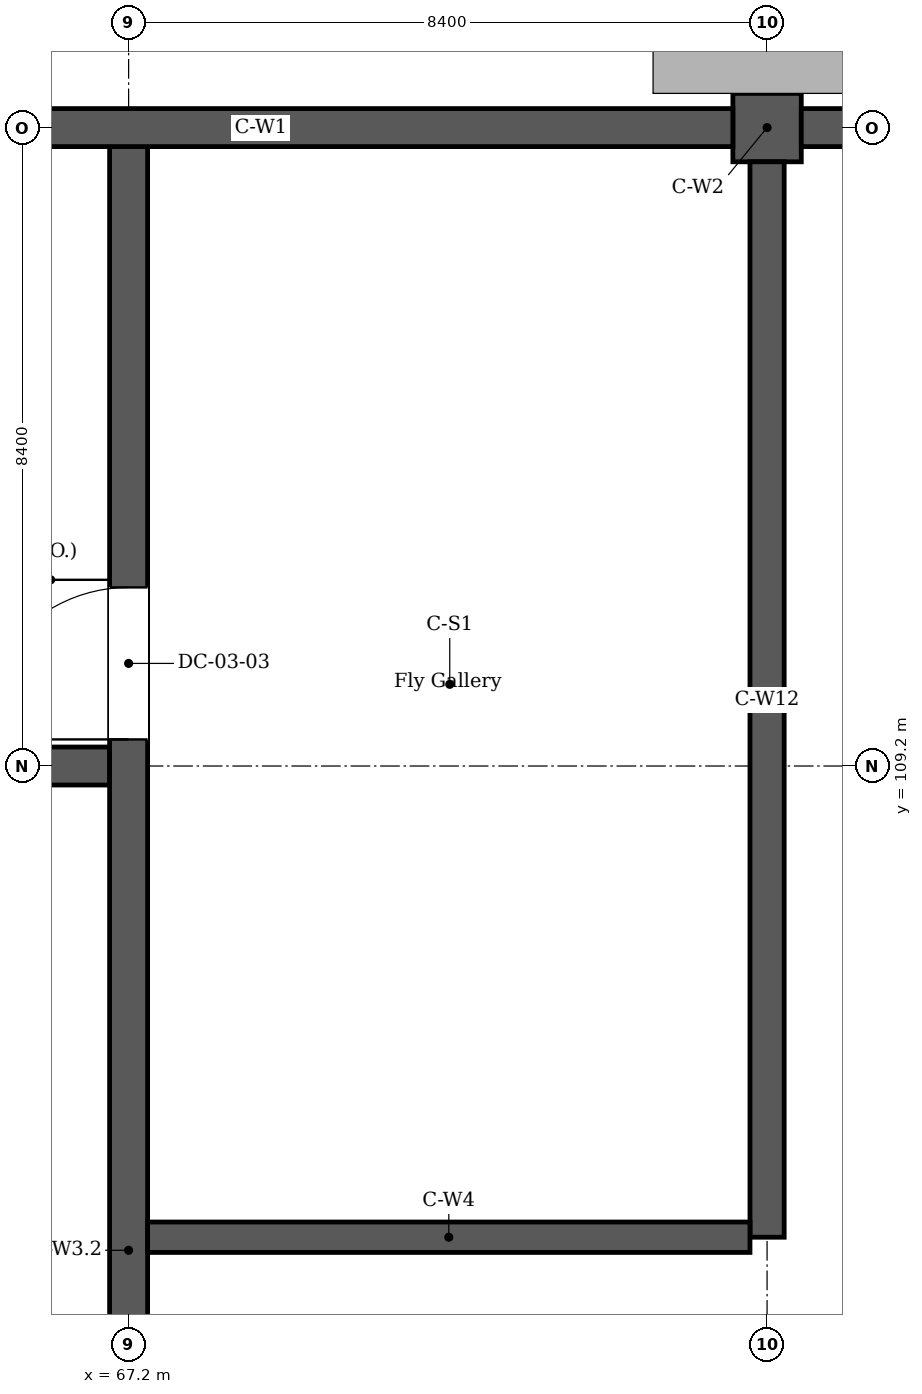
"""IFC4 building model, lengths in metres.
Left out: names, types, materials, properties, quantities, classifications, styles, units other than length and angle.
Written with IfcOpenShell. Run it as: python <this file> out.ifc"""

import sys

from ifc_helpers import new_model, si_unit, direction, frame, frame_2d, origin, place, context, subcontext, project, spatial, rectangle, extrude, element, fill, save


model = new_model("IFC4")
c1 = context("Model", 3, precision=1e-05, world=origin(), true_north=direction((0.0, 1.0)))
c2 = subcontext(c1, "Body", "Model", "MODEL_VIEW")
j1 = project(units=[si_unit("LENGTHUNIT", "METRE"), si_unit("PLANEANGLEUNIT", "RADIAN")], contexts=[c1])
p1 = place(None, origin())
s1 = spatial("IfcSite", under=j1, at=p1, CompositionType="ELEMENT")
p2 = place(p1, origin())
s2 = spatial("IfcBuilding", under=s1, at=p2, CompositionType="ELEMENT")
p3 = place(p2, frame((0.0, 0.0, 14.4)))
s3 = spatial("IfcBuildingStorey", under=s2, at=p3, CompositionType="ELEMENT", Elevation=14.4)
p4 = place(p3, frame((76.05, 117.6, 0.0), z_axis=(0.0, 0.0, 1.0), x_axis=(1.0, 0.0, 0.0)))
e1 = element("IfcWall", 1, at=p4, inside=s3, PredefinedType="SOLIDWALL", context=c2, shape_type="SweptSolid", body=[
    extrude(rectangle(XDim=7.5, YDim=0.5, at=frame_2d((3.75, 0.0))), origin(), (0.0, 0.0, 1.0), 4.2),
])
p5 = place(p3, frame((58.55, 117.6, 0.0), z_axis=(0.0, 0.0, 1.0), x_axis=(1.0, 0.0, 0.0)))
e2 = element("IfcWall", 2, at=p5, inside=s3, PredefinedType="SOLIDWALL", context=c2, shape_type="SweptSolid", body=[
    extrude(rectangle(XDim=16.6, YDim=0.5, at=frame_2d((8.3, 0.0))), origin(), (0.0, 0.0, 1.0), 4.2),
])
p6 = place(p5, frame((4.0, 0.0, 0.9)))
e3 = element("IfcOpeningElement", 3, at=p6, cuts=e2, PredefinedType="OPENING", context=c2, shape_type="SweptSolid", body=[
    extrude(rectangle(XDim=0.9, YDim=2.4, at=frame_2d((0.45, 1.2))), frame((0.0, 0.26, 0.0), z_axis=(0.0, -1.0, 0.0), x_axis=(1.0, 0.0, 0.0)), (0.0, 0.0, 1.0), 0.52),
])
p7 = place(p3, frame((76.05, 117.6, 0.0), z_axis=(0.0, 0.0, 1.0), x_axis=(-1.0, 0.0, 0.0)))
e4 = element("IfcWall", 4, at=p7, inside=s3, PredefinedType="SOLIDWALL", context=c2, shape_type="SweptSolid", body=[
    extrude(rectangle(XDim=0.9, YDim=0.9, at=frame_2d((0.45, 0.0))), origin(), (0.0, 0.0, 1.0), 4.2),
])
p8 = place(p3, frame((67.2, 75.85, 0.0), z_axis=(0.0, 0.0, 1.0), x_axis=(0.0, 1.0, 0.0)))
e5 = element("IfcWall", 5, at=p8, inside=s3, PredefinedType="SOLIDWALL", context=c2, shape_type="SweptSolid", body=[
    extrude(rectangle(XDim=41.5, YDim=0.5, at=frame_2d((20.75, 0.0))), origin(), (0.0, 0.0, 1.0), 4.2),
])
p9 = place(p8, frame((33.7, 0.0, 0.0)))
e6 = element("IfcOpeningElement", 6, at=p9, cuts=e5, PredefinedType="OPENING", context=c2, shape_type="SweptSolid", body=[
    extrude(rectangle(XDim=2.0, YDim=2.1, at=frame_2d((1.0, 1.05))), frame((0.0, 0.26, 0.0), z_axis=(0.0, -1.0, 0.0), x_axis=(1.0, 0.0, 0.0)), (0.0, 0.0, 1.0), 0.52),
])
p10 = place(p3, frame((75.6, 103.0, 0.0), z_axis=(0.0, 0.0, 1.0), x_axis=(0.0, 1.0, 0.0)))
e7 = element("IfcWall", 7, at=p10, inside=s3, PredefinedType="SOLIDWALL", context=c2, shape_type="SweptSolid", body=[
    extrude(rectangle(XDim=14.15, YDim=0.45, at=frame_2d((7.075, 0.0))), origin(), (0.0, 0.0, 1.0), 4.2),
])
p11 = place(p3, frame((67.45, 103.0, 0.0), z_axis=(0.0, 0.0, 1.0), x_axis=(1.0, 0.0, 0.0)))
e8 = element("IfcWall", 8, at=p11, inside=s3, PredefinedType="SOLIDWALL", context=c2, shape_type="SweptSolid", body=[
    extrude(rectangle(XDim=7.925, YDim=0.4, at=frame_2d((3.962, 0.0))), origin(), (0.0, 0.0, 1.0), 4.2),
])
p12 = place(p3, frame((59.05, 109.2, 0.0), z_axis=(0.0, 0.0, 1.0), x_axis=(1.0, 0.0, 0.0)))
e9 = element("IfcWall", 9, at=p12, inside=s3, PredefinedType="SOLIDWALL", context=c2, shape_type="SweptSolid", body=[
    extrude(rectangle(XDim=7.9, YDim=0.5, at=frame_2d((3.95, 0.0))), origin(), (0.0, 0.0, 1.0), 3.8),
])
p13 = place(p9, origin())
e10 = element("IfcDoor", 10, at=p13, inside=s3, OperationType="DOUBLE_DOOR_DOUBLE_SWING", PredefinedType="DOOR", context=c2, shape_type="SweptSolid", body=[
    extrude(rectangle(XDim=2.0, YDim=2.1, at=frame_2d((1.0, 1.05))), frame((0.0, 0.025, 0.0), z_axis=(0.0, -1.0, 0.0), x_axis=(1.0, 0.0, 0.0)), (0.0, 0.0, 1.0), 0.05),
])
fill(e6, e10)
save(model, sys.argv[1])
